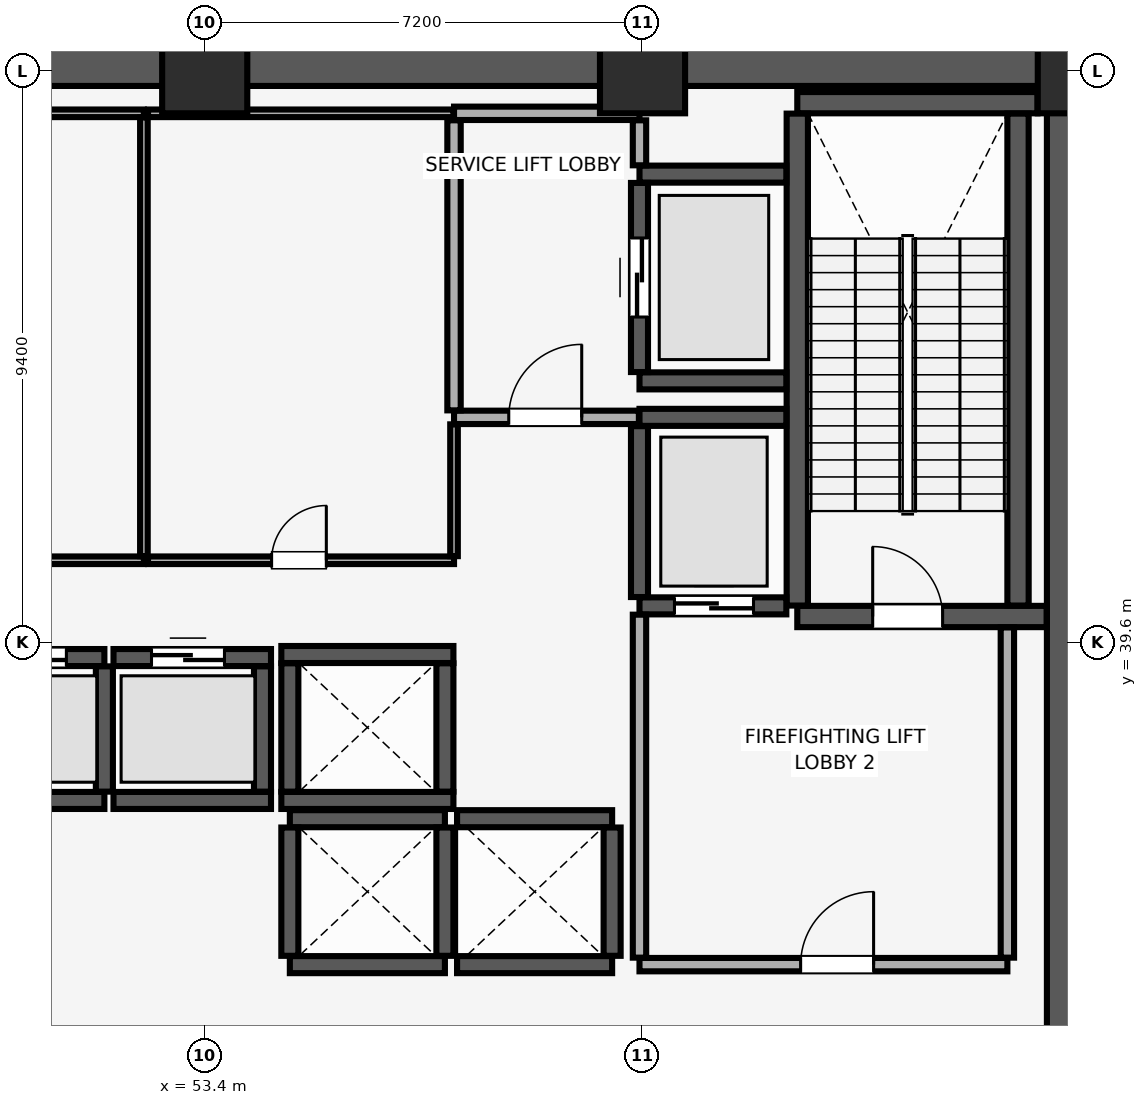
"""IFC4 building model, lengths in metres.
Left out: names, types, materials, properties, quantities, classifications, styles, units other than length and angle.
Written with IfcOpenShell. Run it as: python <this file> out.ifc"""

import sys

from ifc_helpers import new_model, si_unit, direction, frame, frame_2d, origin, origin_2d, place, context, subcontext, project, spatial, rectangle, extrude, element, fill, save


model = new_model("IFC4")
c1 = context("Model", 3, precision=1e-05, world=origin(), true_north=direction((0.0, 1.0)))
c2 = subcontext(c1, "Body", "Model", "MODEL_VIEW")
j1 = project(units=[si_unit("LENGTHUNIT", "METRE"), si_unit("PLANEANGLEUNIT", "RADIAN")], contexts=[c1])
p1 = place(None, origin())
s1 = spatial("IfcSite", under=j1, at=p1, CompositionType="ELEMENT")
p2 = place(p1, origin())
s2 = spatial("IfcBuilding", under=s1, at=p2, CompositionType="ELEMENT")
p3 = place(p2, frame((0.0, 0.0, 8.0)))
s3 = spatial("IfcBuildingStorey", under=s2, at=p3, CompositionType="ELEMENT", Elevation=8.0)
for number, where, z_axis, x_axis in (
    (1, (53.4, 49.0, 0.0), (0.0, 0.0, 1.0), (1.0, 0.0, 0.0)),
    (2, (60.6, 49.0, 0.0), (0.0, 0.0, 1.0), (1.0, 0.0, 0.0)),
    (3, (67.8, 49.0, 0.0), (0.0, 0.0, 1.0), (1.0, 0.0, 0.0)),
):
    element("IfcColumn", number, at=place(p3, frame(where, z_axis=z_axis, x_axis=x_axis)), inside=s3, PredefinedType="COLUMN", context=c2, shape_type="SweptSolid", body=[
        extrude(rectangle(XDim=1.4, YDim=1.4, at=origin_2d()), origin(), (0.0, 0.0, 1.0), 5.68),
    ])
p4 = place(p3, frame((16.2, 49.3, 0.0), z_axis=(0.0, 0.0, 1.0), x_axis=(1.0, 0.0, 0.0)))
e4 = element("IfcWall", 4, at=p4, inside=s3, PredefinedType="SHEAR", context=c2, shape_type="SweptSolid", body=[
    extrude(rectangle(XDim=51.6, YDim=1.1, at=frame_2d((25.8, 0.0))), origin(), (0.0, 0.0, 1.0), 5.68),
])
p5 = place(p3, frame((67.8, 29.4, 0.0), z_axis=(0.0, 0.0, 1.0), x_axis=(0.0, 1.0, 0.0)))
e5 = element("IfcWall", 5, at=p5, inside=s3, PredefinedType="SHEAR", context=c2, shape_type="SweptSolid", body=[
    extrude(rectangle(XDim=19.2, YDim=1.1, at=frame_2d((9.6, 0.0))), origin(), (0.0, 0.0, 1.0), 5.68),
])
p6 = place(p3, frame((63.145, 40.025, 0.0), z_axis=(0.0, 0.0, 1.0), x_axis=(1.0, 0.0, 0.0)))
e6 = element("IfcWall", 6, at=p6, inside=s3, PredefinedType="SHEAR", context=c2, shape_type="SweptSolid", body=[
    extrude(rectangle(XDim=4.1, YDim=0.35, at=frame_2d((2.05, 0.0))), origin(), (0.0, 0.0, 1.0), 5.68),
])
p7 = place(p6, frame((1.24, 0.0, 0.0)))
e7 = element("IfcOpeningElement", 7, at=p7, cuts=e6, PredefinedType="OPENING", context=c2, shape_type="SweptSolid", body=[
    extrude(rectangle(XDim=1.15, YDim=2.15, at=frame_2d((0.575, 1.075))), frame((0.0, 0.185, 0.0), z_axis=(0.0, -1.0, 0.0), x_axis=(1.0, 0.0, 0.0)), (0.0, 0.0, 1.0), 0.37),
])
p8 = place(p3, frame((63.145, 48.475, 0.0), z_axis=(0.0, 0.0, 1.0), x_axis=(1.0, 0.0, 0.0)))
e8 = element("IfcWall", 8, at=p8, inside=s3, PredefinedType="SHEAR", context=c2, shape_type="SweptSolid", body=[
    extrude(rectangle(XDim=3.95, YDim=0.35, at=frame_2d((1.975, 0.0))), origin(), (0.0, 0.0, 1.0), 5.68),
])
for number, where, z_axis, x_axis in (
    (9, (63.145, 40.205, 0.0), (0.0, 0.0, 1.0), (0.0, 1.0, 0.0)),
    (10, (66.775, 40.205, 0.0), (0.0, 0.0, 1.0), (0.0, 1.0, 0.0)),
):
    element("IfcWall", number, at=place(p3, frame(where, z_axis=z_axis, x_axis=x_axis)), inside=s3, PredefinedType="SHEAR", context=c2, shape_type="SweptSolid", body=[
        extrude(rectangle(XDim=8.09, YDim=0.35, at=frame_2d((4.045, 0.0))), origin(), (0.0, 0.0, 1.0), 5.68),
    ])
p9 = place(p3, frame((49.3, 37.0, 0.0), z_axis=(0.0, 0.0, 1.0), x_axis=(1.0, 0.0, 0.0)))
e11 = element("IfcWall", 11, at=p9, inside=s3, PredefinedType="SHEAR", context=c2, shape_type="SweptSolid", body=[
    extrude(rectangle(XDim=2.45, YDim=0.28, at=frame_2d((1.225, 0.0))), origin(), (0.0, 0.0, 1.0), 5.68),
])
p10 = place(p3, frame((49.3, 39.35, 0.0), z_axis=(0.0, 0.0, 1.0), x_axis=(1.0, 0.0, 0.0)))
e12 = element("IfcWall", 12, at=p10, inside=s3, PredefinedType="SHEAR", context=c2, shape_type="SweptSolid", body=[
    extrude(rectangle(XDim=2.45, YDim=0.28, at=frame_2d((1.225, 0.0))), origin(), (0.0, 0.0, 1.0), 5.68),
])
p11 = place(p10, frame((0.625, 0.0, 0.0)))
e13 = element("IfcOpeningElement", 13, at=p11, cuts=e12, PredefinedType="OPENING", context=c2, shape_type="SweptSolid", body=[
    extrude(rectangle(XDim=1.2, YDim=2.25, at=frame_2d((0.6, 1.125))), frame((0.0, 0.15, 0.0), z_axis=(0.0, -1.0, 0.0), x_axis=(1.0, 0.0, 0.0)), (0.0, 0.0, 1.0), 0.3),
])
p12 = place(p3, frame((51.75, 37.145, 0.0), z_axis=(0.0, 0.0, 1.0), x_axis=(0.0, 1.0, 0.0)))
e14 = element("IfcWall", 14, at=p12, inside=s3, PredefinedType="SHEAR", context=c2, shape_type="SweptSolid", body=[
    extrude(rectangle(XDim=2.06, YDim=0.28, at=frame_2d((1.03, 0.0))), origin(), (0.0, 0.0, 1.0), 5.68),
])
p13 = place(p3, frame((51.9, 37.0, 0.0), z_axis=(0.0, 0.0, 1.0), x_axis=(1.0, 0.0, 0.0)))
e15 = element("IfcWall", 15, at=p13, inside=s3, PredefinedType="SHEAR", context=c2, shape_type="SweptSolid", body=[
    extrude(rectangle(XDim=2.59, YDim=0.28, at=frame_2d((1.295, 0.0))), origin(), (0.0, 0.0, 1.0), 5.68),
])
p14 = place(p3, frame((51.9, 39.35, 0.0), z_axis=(0.0, 0.0, 1.0), x_axis=(1.0, 0.0, 0.0)))
e16 = element("IfcWall", 16, at=p14, inside=s3, PredefinedType="SHEAR", context=c2, shape_type="SweptSolid", body=[
    extrude(rectangle(XDim=2.59, YDim=0.28, at=frame_2d((1.295, 0.0))), origin(), (0.0, 0.0, 1.0), 5.68),
])
p15 = place(p14, frame((0.625, 0.0, 0.0)))
e17 = element("IfcOpeningElement", 17, at=p15, cuts=e16, PredefinedType="OPENING", context=c2, shape_type="SweptSolid", body=[
    extrude(rectangle(XDim=1.2, YDim=2.25, at=frame_2d((0.6, 1.125))), frame((0.0, 0.15, 0.0), z_axis=(0.0, -1.0, 0.0), x_axis=(1.0, 0.0, 0.0)), (0.0, 0.0, 1.0), 0.3),
])
p16 = place(p3, frame((54.35, 37.145, 0.0), z_axis=(0.0, 0.0, 1.0), x_axis=(0.0, 1.0, 0.0)))
e18 = element("IfcWall", 18, at=p16, inside=s3, PredefinedType="SHEAR", context=c2, shape_type="SweptSolid", body=[
    extrude(rectangle(XDim=2.06, YDim=0.28, at=frame_2d((1.03, 0.0))), origin(), (0.0, 0.0, 1.0), 5.68),
])
for number, where, z_axis, x_axis in (
    (19, (54.8, 34.3, 0.0), (0.0, 0.0, 1.0), (1.0, 0.0, 0.0)),
    (20, (54.8, 36.7, 0.0), (0.0, 0.0, 1.0), (1.0, 0.0, 0.0)),
):
    element("IfcWall", number, at=place(p3, frame(where, z_axis=z_axis, x_axis=x_axis)), inside=s3, PredefinedType="SHEAR", context=c2, shape_type="SweptSolid", body=[
        extrude(rectangle(XDim=2.55, YDim=0.28, at=frame_2d((1.275, 0.0))), origin(), (0.0, 0.0, 1.0), 5.68),
    ])
for number, where, z_axis, x_axis in (
    (21, (54.8, 34.445, 0.0), (0.0, 0.0, 1.0), (0.0, 1.0, 0.0)),
    (22, (57.35, 34.445, 0.0), (0.0, 0.0, 1.0), (0.0, 1.0, 0.0)),
):
    element("IfcWall", number, at=place(p3, frame(where, z_axis=z_axis, x_axis=x_axis)), inside=s3, PredefinedType="SHEAR", context=c2, shape_type="SweptSolid", body=[
        extrude(rectangle(XDim=2.11, YDim=0.28, at=frame_2d((1.055, 0.0))), origin(), (0.0, 0.0, 1.0), 5.68),
    ])
for number, where, z_axis, x_axis in (
    (23, (57.55, 34.3, 0.0), (0.0, 0.0, 1.0), (1.0, 0.0, 0.0)),
    (24, (57.55, 36.7, 0.0), (0.0, 0.0, 1.0), (1.0, 0.0, 0.0)),
):
    element("IfcWall", number, at=place(p3, frame(where, z_axis=z_axis, x_axis=x_axis)), inside=s3, PredefinedType="SHEAR", context=c2, shape_type="SweptSolid", body=[
        extrude(rectangle(XDim=2.55, YDim=0.28, at=frame_2d((1.275, 0.0))), origin(), (0.0, 0.0, 1.0), 5.68),
    ])
p17 = place(p3, frame((60.1, 34.445, 0.0), z_axis=(0.0, 0.0, 1.0), x_axis=(0.0, 1.0, 0.0)))
e25 = element("IfcWall", 25, at=p17, inside=s3, PredefinedType="SHEAR", context=c2, shape_type="SweptSolid", body=[
    extrude(rectangle(XDim=2.11, YDim=0.28, at=frame_2d((1.055, 0.0))), origin(), (0.0, 0.0, 1.0), 5.68),
])
for number, where, z_axis, x_axis in (
    (26, (54.66, 37.0, 0.0), (0.0, 0.0, 1.0), (1.0, 0.0, 0.0)),
    (27, (54.66, 39.4, 0.0), (0.0, 0.0, 1.0), (1.0, 0.0, 0.0)),
):
    element("IfcWall", number, at=place(p3, frame(where, z_axis=z_axis, x_axis=x_axis)), inside=s3, PredefinedType="SHEAR", context=c2, shape_type="SweptSolid", body=[
        extrude(rectangle(XDim=2.83, YDim=0.28, at=frame_2d((1.415, 0.0))), origin(), (0.0, 0.0, 1.0), 5.68),
    ])
for number, where, z_axis, x_axis in (
    (28, (54.8, 37.145, 0.0), (0.0, 0.0, 1.0), (0.0, 1.0, 0.0)),
    (29, (57.35, 37.145, 0.0), (0.0, 0.0, 1.0), (0.0, 1.0, 0.0)),
):
    element("IfcWall", number, at=place(p3, frame(where, z_axis=z_axis, x_axis=x_axis)), inside=s3, PredefinedType="SHEAR", context=c2, shape_type="SweptSolid", body=[
        extrude(rectangle(XDim=2.11, YDim=0.28, at=frame_2d((1.055, 0.0))), origin(), (0.0, 0.0, 1.0), 5.68),
    ])
p18 = place(p3, frame((60.55, 40.2, 0.0), z_axis=(0.0, 0.0, 1.0), x_axis=(1.0, 0.0, 0.0)))
e30 = element("IfcWall", 30, at=p18, inside=s3, PredefinedType="SHEAR", context=c2, shape_type="SweptSolid", body=[
    extrude(rectangle(XDim=2.415, YDim=0.28, at=frame_2d((1.208, 0.0))), origin(), (0.0, 0.0, 1.0), 5.68),
])
p19 = place(p18, frame((0.575, 0.0, 0.0)))
e31 = element("IfcOpeningElement", 31, at=p19, cuts=e30, PredefinedType="OPENING", context=c2, shape_type="SweptSolid", body=[
    extrude(rectangle(XDim=1.3, YDim=2.3, at=frame_2d((0.65, 1.15))), frame((0.0, 0.15, 0.0), z_axis=(0.0, -1.0, 0.0), x_axis=(1.0, 0.0, 0.0)), (0.0, 0.0, 1.0), 0.3),
])
p20 = place(p3, frame((60.55, 43.3, 0.0), z_axis=(0.0, 0.0, 1.0), x_axis=(1.0, 0.0, 0.0)))
e32 = element("IfcWall", 32, at=p20, inside=s3, PredefinedType="SHEAR", context=c2, shape_type="SweptSolid", body=[
    extrude(rectangle(XDim=2.415, YDim=0.28, at=frame_2d((1.208, 0.0))), origin(), (0.0, 0.0, 1.0), 5.68),
])
p21 = place(p3, frame((60.55, 40.345, 0.0), z_axis=(0.0, 0.0, 1.0), x_axis=(0.0, 1.0, 0.0)))
e33 = element("IfcWall", 33, at=p21, inside=s3, PredefinedType="SHEAR", context=c2, shape_type="SweptSolid", body=[
    extrude(rectangle(XDim=2.81, YDim=0.28, at=frame_2d((1.405, 0.0))), origin(), (0.0, 0.0, 1.0), 5.68),
])
for number, where, z_axis, x_axis in (
    (34, (60.55, 43.9, 0.0), (0.0, 0.0, 1.0), (1.0, 0.0, 0.0)),
    (35, (60.55, 47.3, 0.0), (0.0, 0.0, 1.0), (1.0, 0.0, 0.0)),
):
    element("IfcWall", number, at=place(p3, frame(where, z_axis=z_axis, x_axis=x_axis)), inside=s3, PredefinedType="SHEAR", context=c2, shape_type="SweptSolid", body=[
        extrude(rectangle(XDim=2.415, YDim=0.28, at=frame_2d((1.208, 0.0))), origin(), (0.0, 0.0, 1.0), 5.68),
    ])
p22 = place(p3, frame((60.55, 44.045, 0.0), z_axis=(0.0, 0.0, 1.0), x_axis=(0.0, 1.0, 0.0)))
e36 = element("IfcWall", 36, at=p22, inside=s3, PredefinedType="SHEAR", context=c2, shape_type="SweptSolid", body=[
    extrude(rectangle(XDim=3.11, YDim=0.28, at=frame_2d((1.555, 0.0))), origin(), (0.0, 0.0, 1.0), 5.68),
])
p23 = place(p22, frame((0.905, 0.0, 0.0)))
e37 = element("IfcOpeningElement", 37, at=p23, cuts=e36, PredefinedType="OPENING", context=c2, shape_type="SweptSolid", body=[
    extrude(rectangle(XDim=1.3, YDim=2.3, at=frame_2d((0.65, 1.15))), frame((0.0, 0.15, 0.0), z_axis=(0.0, -1.0, 0.0), x_axis=(1.0, 0.0, 0.0)), (0.0, 0.0, 1.0), 0.3),
])
p24 = place(p3, frame((60.55, 34.3, 0.0), z_axis=(0.0, 0.0, 1.0), x_axis=(1.0, 0.0, 0.0)))
e38 = element("IfcWall", 38, at=p24, inside=s3, PredefinedType="PARTITIONING", context=c2, shape_type="SweptSolid", body=[
    extrude(rectangle(XDim=6.05, YDim=0.22, at=frame_2d((3.025, 0.0))), origin(), (0.0, 0.0, 1.0), 5.68),
])
p25 = place(p24, frame((2.65, 0.0, 0.0)))
e39 = element("IfcOpeningElement", 39, at=p25, cuts=e38, PredefinedType="OPENING", context=c2, shape_type="SweptSolid", body=[
    extrude(rectangle(XDim=1.2, YDim=2.15, at=frame_2d((0.6, 1.075))), frame((0.0, 0.12, 0.0), z_axis=(0.0, -1.0, 0.0), x_axis=(1.0, 0.0, 0.0)), (0.0, 0.0, 1.0), 0.24),
])
p26 = place(p3, frame((60.55, 34.415, 0.0), z_axis=(0.0, 0.0, 1.0), x_axis=(0.0, 1.0, 0.0)))
e40 = element("IfcWall", 40, at=p26, inside=s3, PredefinedType="PARTITIONING", context=c2, shape_type="SweptSolid", body=[
    extrude(rectangle(XDim=5.64, YDim=0.22, at=frame_2d((2.82, 0.0))), origin(), (0.0, 0.0, 1.0), 5.68),
])
p27 = place(p3, frame((66.6, 34.415, 0.0), z_axis=(0.0, 0.0, 1.0), x_axis=(0.0, 1.0, 0.0)))
e41 = element("IfcWall", 41, at=p27, inside=s3, PredefinedType="PARTITIONING", context=c2, shape_type="SweptSolid", body=[
    extrude(rectangle(XDim=5.43, YDim=0.22, at=frame_2d((2.715, 0.0))), origin(), (0.0, 0.0, 1.0), 5.68),
])
p28 = place(p3, frame((57.5, 43.3, 0.0), z_axis=(0.0, 0.0, 1.0), x_axis=(1.0, 0.0, 0.0)))
e42 = element("IfcWall", 42, at=p28, inside=s3, PredefinedType="PARTITIONING", context=c2, shape_type="SweptSolid", body=[
    extrude(rectangle(XDim=3.04, YDim=0.22, at=frame_2d((1.52, 0.0))), origin(), (0.0, 0.0, 1.0), 5.68),
])
p29 = place(p28, frame((0.9, 0.0, 0.0)))
e43 = element("IfcOpeningElement", 43, at=p29, cuts=e42, PredefinedType="OPENING", context=c2, shape_type="SweptSolid", body=[
    extrude(rectangle(XDim=1.2, YDim=2.15, at=frame_2d((0.6, 1.075))), frame((0.0, 0.12, 0.0), z_axis=(0.0, -1.0, 0.0), x_axis=(1.0, 0.0, 0.0)), (0.0, 0.0, 1.0), 0.24),
])
p30 = place(p3, frame((57.5, 48.3, 0.0), z_axis=(0.0, 0.0, 1.0), x_axis=(1.0, 0.0, 0.0)))
e44 = element("IfcWall", 44, at=p30, inside=s3, PredefinedType="PARTITIONING", context=c2, shape_type="SweptSolid", body=[
    extrude(rectangle(XDim=3.05, YDim=0.22, at=frame_2d((1.525, 0.0))), origin(), (0.0, 0.0, 1.0), 5.68),
])
p31 = place(p3, frame((57.5, 43.415, 0.0), z_axis=(0.0, 0.0, 1.0), x_axis=(0.0, 1.0, 0.0)))
e45 = element("IfcWall", 45, at=p31, inside=s3, PredefinedType="PARTITIONING", context=c2, shape_type="SweptSolid", body=[
    extrude(rectangle(XDim=4.77, YDim=0.22, at=frame_2d((2.385, 0.0))), origin(), (0.0, 0.0, 1.0), 5.68),
])
p32 = place(p3, frame((60.55, 47.445, 0.0), z_axis=(0.0, 0.0, 1.0), x_axis=(0.0, 1.0, 0.0)))
e46 = element("IfcWall", 46, at=p32, inside=s3, PredefinedType="PARTITIONING", context=c2, shape_type="SweptSolid", body=[
    extrude(rectangle(XDim=0.74, YDim=0.22, at=frame_2d((0.37, 0.0))), origin(), (0.0, 0.0, 1.0), 5.68),
])
p33 = place(p3, frame((47.468, 40.95, 0.0), z_axis=(0.0, 0.0, 1.0), x_axis=(1.0, 0.0, 0.0)))
e47 = element("IfcWall", 47, at=p33, inside=s3, PredefinedType="PARTITIONING", context=c2, shape_type="SweptSolid", body=[
    extrude(rectangle(XDim=4.932, YDim=0.125, at=frame_2d((2.466, 0.0))), origin(), (0.0, 0.0, 1.0), 5.68),
])
p34 = place(p33, frame((1.982, 0.0, 0.0)))
e48 = element("IfcOpeningElement", 48, at=p34, cuts=e47, PredefinedType="OPENING", context=c2, shape_type="SweptSolid", body=[
    extrude(rectangle(XDim=0.9, YDim=2.1, at=frame_2d((0.45, 1.05))), frame((0.0, 0.073, 0.0), z_axis=(0.0, -1.0, 0.0), x_axis=(1.0, 0.0, 0.0)), (0.0, 0.0, 1.0), 0.145),
])
p35 = place(p3, frame((47.468, 48.3, 0.0), z_axis=(0.0, 0.0, 1.0), x_axis=(1.0, 0.0, 0.0)))
e49 = element("IfcWall", 49, at=p35, inside=s3, PredefinedType="PARTITIONING", context=c2, shape_type="SweptSolid", body=[
    extrude(rectangle(XDim=4.932, YDim=0.125, at=frame_2d((2.466, 0.0))), origin(), (0.0, 0.0, 1.0), 5.68),
])
p36 = place(p3, frame((52.4, 41.018, 0.0), z_axis=(0.0, 0.0, 1.0), x_axis=(0.0, 1.0, 0.0)))
e50 = element("IfcWall", 50, at=p36, inside=s3, PredefinedType="PARTITIONING", context=c2, shape_type="SweptSolid", body=[
    extrude(rectangle(XDim=7.215, YDim=0.125, at=frame_2d((3.607, 0.0))), origin(), (0.0, 0.0, 1.0), 5.68),
])
p37 = place(p3, frame((52.468, 40.95, 0.0), z_axis=(0.0, 0.0, 1.0), x_axis=(1.0, 0.0, 0.0)))
e51 = element("IfcWall", 51, at=p37, inside=s3, PredefinedType="PARTITIONING", context=c2, shape_type="SweptSolid", body=[
    extrude(rectangle(XDim=5.032, YDim=0.125, at=frame_2d((2.516, 0.0))), origin(), (0.0, 0.0, 1.0), 5.68),
])
p38 = place(p37, frame((2.032, 0.0, 0.0)))
e52 = element("IfcOpeningElement", 52, at=p38, cuts=e51, PredefinedType="OPENING", context=c2, shape_type="SweptSolid", body=[
    extrude(rectangle(XDim=0.9, YDim=2.1, at=frame_2d((0.45, 1.05))), frame((0.0, 0.073, 0.0), z_axis=(0.0, -1.0, 0.0), x_axis=(1.0, 0.0, 0.0)), (0.0, 0.0, 1.0), 0.145),
])
p39 = place(p3, frame((52.468, 48.3, 0.0), z_axis=(0.0, 0.0, 1.0), x_axis=(1.0, 0.0, 0.0)))
e53 = element("IfcWall", 53, at=p39, inside=s3, PredefinedType="PARTITIONING", context=c2, shape_type="SweptSolid", body=[
    extrude(rectangle(XDim=5.022, YDim=0.125, at=frame_2d((2.511, 0.0))), origin(), (0.0, 0.0, 1.0), 5.68),
])
p40 = place(p3, frame((57.5, 41.018, 0.0), z_axis=(0.0, 0.0, 1.0), x_axis=(0.0, 1.0, 0.0)))
e54 = element("IfcWall", 54, at=p40, inside=s3, PredefinedType="PARTITIONING", context=c2, shape_type="SweptSolid", body=[
    extrude(rectangle(XDim=2.167, YDim=0.125, at=frame_2d((1.084, 0.0))), origin(), (0.0, 0.0, 1.0), 5.68),
])
p41 = place(p7, origin())
e55 = element("IfcDoor", 55, at=p41, inside=s3, OperationType="SINGLE_SWING_LEFT", PredefinedType="DOOR", context=c2, shape_type="SweptSolid", body=[
    extrude(rectangle(XDim=1.15, YDim=2.15, at=frame_2d((0.575, 1.075))), frame((0.0, 0.025, 0.0), z_axis=(0.0, -1.0, 0.0), x_axis=(1.0, 0.0, 0.0)), (0.0, 0.0, 1.0), 0.05),
])
fill(e7, e55)
p42 = place(p11, origin())
e56 = element("IfcDoor", 56, at=p42, inside=s3, OperationType="DOUBLE_DOOR_SLIDING", PredefinedType="DOOR", context=c2, shape_type="SweptSolid", body=[
    extrude(rectangle(XDim=1.2, YDim=2.25, at=frame_2d((0.6, 1.125))), frame((0.0, 0.025, 0.0), z_axis=(0.0, -1.0, 0.0), x_axis=(1.0, 0.0, 0.0)), (0.0, 0.0, 1.0), 0.05),
])
fill(e13, e56)
p43 = place(p15, origin())
e57 = element("IfcDoor", 57, at=p43, inside=s3, OperationType="DOUBLE_DOOR_SLIDING", PredefinedType="DOOR", context=c2, shape_type="SweptSolid", body=[
    extrude(rectangle(XDim=1.2, YDim=2.25, at=frame_2d((0.6, 1.125))), frame((0.0, 0.025, 0.0), z_axis=(0.0, -1.0, 0.0), x_axis=(1.0, 0.0, 0.0)), (0.0, 0.0, 1.0), 0.05),
])
fill(e17, e57)
p44 = place(p19, origin())
e58 = element("IfcDoor", 58, at=p44, inside=s3, OperationType="DOUBLE_DOOR_SLIDING", PredefinedType="DOOR", context=c2, shape_type="SweptSolid", body=[
    extrude(rectangle(XDim=1.3, YDim=2.3, at=frame_2d((0.65, 1.15))), frame((0.0, 0.025, 0.0), z_axis=(0.0, -1.0, 0.0), x_axis=(1.0, 0.0, 0.0)), (0.0, 0.0, 1.0), 0.05),
])
fill(e31, e58)
p45 = place(p23, origin())
e59 = element("IfcDoor", 59, at=p45, inside=s3, OperationType="DOUBLE_DOOR_SLIDING", PredefinedType="DOOR", context=c2, shape_type="SweptSolid", body=[
    extrude(rectangle(XDim=1.3, YDim=2.3, at=frame_2d((0.65, 1.15))), frame((0.0, 0.025, 0.0), z_axis=(0.0, -1.0, 0.0), x_axis=(1.0, 0.0, 0.0)), (0.0, 0.0, 1.0), 0.05),
])
fill(e37, e59)
p46 = place(p25, origin())
e60 = element("IfcDoor", 60, at=p46, inside=s3, OperationType="SINGLE_SWING_RIGHT", PredefinedType="DOOR", context=c2, shape_type="SweptSolid", body=[
    extrude(rectangle(XDim=1.2, YDim=2.15, at=frame_2d((0.6, 1.075))), frame((0.0, 0.025, 0.0), z_axis=(0.0, -1.0, 0.0), x_axis=(1.0, 0.0, 0.0)), (0.0, 0.0, 1.0), 0.05),
])
fill(e39, e60)
p47 = place(p29, origin())
e61 = element("IfcDoor", 61, at=p47, inside=s3, OperationType="SINGLE_SWING_RIGHT", PredefinedType="DOOR", context=c2, shape_type="SweptSolid", body=[
    extrude(rectangle(XDim=1.2, YDim=2.15, at=frame_2d((0.6, 1.075))), frame((0.0, 0.025, 0.0), z_axis=(0.0, -1.0, 0.0), x_axis=(1.0, 0.0, 0.0)), (0.0, 0.0, 1.0), 0.05),
])
fill(e43, e61)
p48 = place(p38, origin())
e62 = element("IfcDoor", 62, at=p48, inside=s3, OperationType="SINGLE_SWING_RIGHT", PredefinedType="DOOR", context=c2, shape_type="SweptSolid", body=[
    extrude(rectangle(XDim=0.9, YDim=2.1, at=frame_2d((0.45, 1.05))), frame((0.0, 0.025, 0.0), z_axis=(0.0, -1.0, 0.0), x_axis=(1.0, 0.0, 0.0)), (0.0, 0.0, 1.0), 0.05),
])
fill(e52, e62)
save(model, sys.argv[1])
